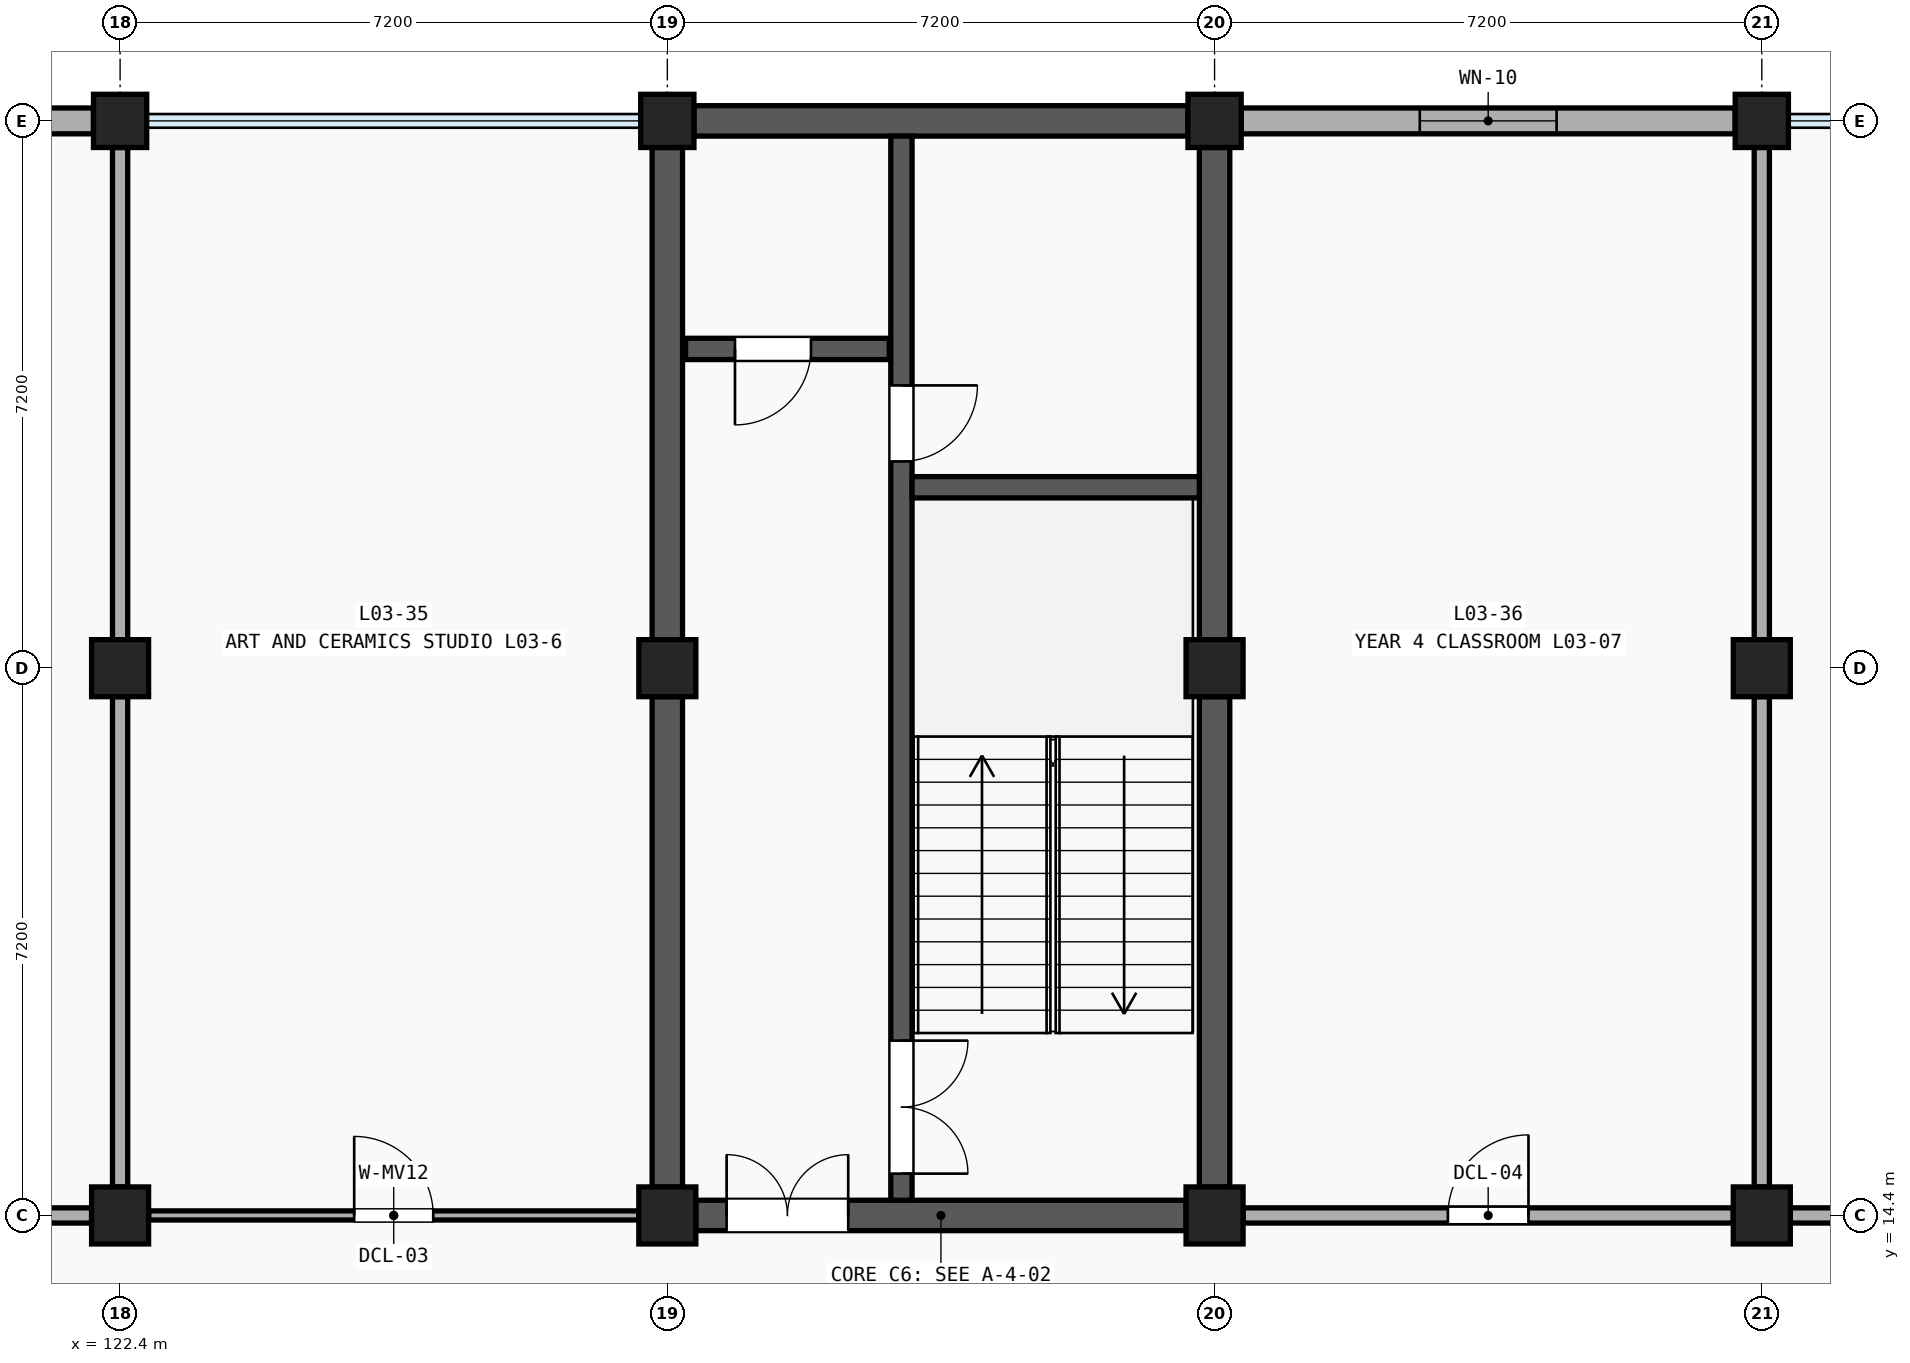
"""IFC4 building model, lengths in metres.
Left out: names, types, materials, properties, quantities, classifications, styles, units other than length and angle.
Written with IfcOpenShell. Run it as: python <this file> out.ifc"""

import sys

from ifc_helpers import new_model, si_unit, direction, frame, frame_2d, origin, origin_2d, place, context, subcontext, project, spatial, rectangle, extrude, element, fill, save


model = new_model("IFC4")
c1 = context("Model", 3, precision=1e-05, world=origin(), true_north=direction((0.0, 1.0)))
c2 = subcontext(c1, "Body", "Model", "MODEL_VIEW")
j1 = project(units=[si_unit("LENGTHUNIT", "METRE"), si_unit("PLANEANGLEUNIT", "RADIAN")], contexts=[c1])
p1 = place(None, origin())
s1 = spatial("IfcSite", under=j1, at=p1, CompositionType="ELEMENT")
p2 = place(p1, origin())
s2 = spatial("IfcBuilding", under=s1, at=p2, CompositionType="ELEMENT")
p3 = place(p2, frame((0.0, 0.0, 14.4)))
s3 = spatial("IfcBuildingStorey", under=s2, at=p3, CompositionType="ELEMENT", Elevation=14.4)
for number, where, z_axis, x_axis in (
    (1, (122.4, 14.4, 0.0), (0.0, 0.0, 1.0), (1.0, 0.0, 0.0)),
    (2, (122.4, 21.6, 0.0), (0.0, 0.0, 1.0), (1.0, 0.0, 0.0)),
):
    element("IfcColumn", number, at=place(p3, frame(where, z_axis=z_axis, x_axis=x_axis)), inside=s3, PredefinedType="COLUMN", context=c2, shape_type="SweptSolid", body=[
        extrude(rectangle(XDim=0.75, YDim=0.75, at=origin_2d()), origin(), (0.0, 0.0, 1.0), 4.2),
    ])
p4 = place(p3, frame((122.4, 28.8, 0.0), z_axis=(0.0, 0.0, 1.0), x_axis=(1.0, 0.0, 0.0)))
e3 = element("IfcColumn", 3, at=p4, inside=s3, PredefinedType="COLUMN", context=c2, shape_type="SweptSolid", body=[
    extrude(rectangle(XDim=0.7, YDim=0.7, at=origin_2d()), origin(), (0.0, 0.0, 1.0), 4.2),
])
for number, where, z_axis, x_axis in (
    (4, (129.6, 14.4, 0.0), (0.0, 0.0, 1.0), (1.0, 0.0, 0.0)),
    (5, (129.6, 21.6, 0.0), (0.0, 0.0, 1.0), (1.0, 0.0, 0.0)),
):
    element("IfcColumn", number, at=place(p3, frame(where, z_axis=z_axis, x_axis=x_axis)), inside=s3, PredefinedType="COLUMN", context=c2, shape_type="SweptSolid", body=[
        extrude(rectangle(XDim=0.75, YDim=0.75, at=origin_2d()), origin(), (0.0, 0.0, 1.0), 4.2),
    ])
p5 = place(p3, frame((129.6, 28.8, 0.0), z_axis=(0.0, 0.0, 1.0), x_axis=(1.0, 0.0, 0.0)))
e6 = element("IfcColumn", 6, at=p5, inside=s3, PredefinedType="COLUMN", context=c2, shape_type="SweptSolid", body=[
    extrude(rectangle(XDim=0.7, YDim=0.7, at=origin_2d()), origin(), (0.0, 0.0, 1.0), 4.2),
])
for number, where, z_axis, x_axis in (
    (7, (136.8, 14.4, 0.0), (0.0, 0.0, 1.0), (1.0, 0.0, 0.0)),
    (8, (136.8, 21.6, 0.0), (0.0, 0.0, 1.0), (1.0, 0.0, 0.0)),
):
    element("IfcColumn", number, at=place(p3, frame(where, z_axis=z_axis, x_axis=x_axis)), inside=s3, PredefinedType="COLUMN", context=c2, shape_type="SweptSolid", body=[
        extrude(rectangle(XDim=0.75, YDim=0.75, at=origin_2d()), origin(), (0.0, 0.0, 1.0), 4.2),
    ])
p6 = place(p3, frame((136.8, 28.8, 0.0), z_axis=(0.0, 0.0, 1.0), x_axis=(1.0, 0.0, 0.0)))
e9 = element("IfcColumn", 9, at=p6, inside=s3, PredefinedType="COLUMN", context=c2, shape_type="SweptSolid", body=[
    extrude(rectangle(XDim=0.7, YDim=0.7, at=origin_2d()), origin(), (0.0, 0.0, 1.0), 4.2),
])
for number, where, z_axis, x_axis in (
    (10, (144.0, 14.4, 0.0), (0.0, 0.0, 1.0), (1.0, 0.0, 0.0)),
    (11, (144.0, 21.6, 0.0), (0.0, 0.0, 1.0), (1.0, 0.0, 0.0)),
):
    element("IfcColumn", number, at=place(p3, frame(where, z_axis=z_axis, x_axis=x_axis)), inside=s3, PredefinedType="COLUMN", context=c2, shape_type="SweptSolid", body=[
        extrude(rectangle(XDim=0.75, YDim=0.75, at=origin_2d()), origin(), (0.0, 0.0, 1.0), 4.2),
    ])
p7 = place(p3, frame((144.0, 28.8, 0.0), z_axis=(0.0, 0.0, 1.0), x_axis=(1.0, 0.0, 0.0)))
e12 = element("IfcColumn", 12, at=p7, inside=s3, PredefinedType="COLUMN", context=c2, shape_type="SweptSolid", body=[
    extrude(rectangle(XDim=0.7, YDim=0.7, at=origin_2d()), origin(), (0.0, 0.0, 1.0), 4.2),
])
p8 = place(p3, frame((115.45, 28.8, 0.0), z_axis=(0.0, 0.0, 1.0), x_axis=(1.0, 0.0, 0.0)))
e13 = element("IfcWall", 13, at=p8, inside=s3, PredefinedType="SOLIDWALL", context=c2, shape_type="SweptSolid", body=[
    extrude(rectangle(XDim=6.6, YDim=0.34, at=frame_2d((3.3, 0.0))), origin(), (0.0, 0.0, 1.0), 3.31),
])
p9 = place(p8, frame((1.8, 0.0, 0.9)))
e14 = element("IfcOpeningElement", 14, at=p9, cuts=e13, PredefinedType="OPENING", context=c2, shape_type="SweptSolid", body=[
    extrude(rectangle(XDim=3.0, YDim=1.8, at=frame_2d((1.5, 0.9))), frame((0.0, 0.182, 0.0), z_axis=(0.0, -1.0, 0.0), x_axis=(1.0, 0.0, 0.0)), (0.0, 0.0, 1.0), 0.364),
])
p10 = place(p3, frame((137.15, 28.8, 0.0), z_axis=(0.0, 0.0, 1.0), x_axis=(1.0, 0.0, 0.0)))
e15 = element("IfcWall", 15, at=p10, inside=s3, PredefinedType="SOLIDWALL", context=c2, shape_type="SweptSolid", body=[
    extrude(rectangle(XDim=6.5, YDim=0.34, at=frame_2d((3.25, 0.0))), origin(), (0.0, 0.0, 1.0), 3.31),
])
p11 = place(p10, frame((2.35, 0.0, 0.85)))
e16 = element("IfcOpeningElement", 16, at=p11, cuts=e15, PredefinedType="OPENING", context=c2, shape_type="SweptSolid", body=[
    extrude(rectangle(XDim=1.8, YDim=2.0, at=frame_2d((0.9, 1.0))), frame((0.0, 0.182, 0.0), z_axis=(0.0, -1.0, 0.0), x_axis=(1.0, 0.0, 0.0)), (0.0, 0.0, 1.0), 0.364),
])
p12 = place(p3, frame((129.6, 14.775, 0.0), z_axis=(0.0, 0.0, 1.0), x_axis=(0.0, 1.0, 0.0)))
e17 = element("IfcWall", 17, at=p12, inside=s3, PredefinedType="SHEAR", context=c2, shape_type="SweptSolid", body=[
    extrude(rectangle(XDim=6.45, YDim=0.4, at=frame_2d((3.225, 0.0))), origin(), (0.0, 0.0, 1.0), 3.17),
])
p13 = place(p3, frame((129.6, 21.975, 0.0), z_axis=(0.0, 0.0, 1.0), x_axis=(0.0, 1.0, 0.0)))
e18 = element("IfcWall", 18, at=p13, inside=s3, PredefinedType="SHEAR", context=c2, shape_type="SweptSolid", body=[
    extrude(rectangle(XDim=6.475, YDim=0.4, at=frame_2d((3.237, 0.0))), origin(), (0.0, 0.0, 1.0), 3.17),
])
p14 = place(p3, frame((136.8, 14.775, 0.0), z_axis=(0.0, 0.0, 1.0), x_axis=(0.0, 1.0, 0.0)))
e19 = element("IfcWall", 19, at=p14, inside=s3, PredefinedType="SHEAR", context=c2, shape_type="SweptSolid", body=[
    extrude(rectangle(XDim=6.45, YDim=0.4, at=frame_2d((3.225, 0.0))), origin(), (0.0, 0.0, 1.0), 3.17),
])
p15 = place(p3, frame((136.8, 21.975, 0.0), z_axis=(0.0, 0.0, 1.0), x_axis=(0.0, 1.0, 0.0)))
e20 = element("IfcWall", 20, at=p15, inside=s3, PredefinedType="SHEAR", context=c2, shape_type="SweptSolid", body=[
    extrude(rectangle(XDim=6.475, YDim=0.4, at=frame_2d((3.237, 0.0))), origin(), (0.0, 0.0, 1.0), 3.17),
])
p16 = place(p3, frame((129.975, 14.4, 0.0), z_axis=(0.0, 0.0, 1.0), x_axis=(1.0, 0.0, 0.0)))
e21 = element("IfcWall", 21, at=p16, inside=s3, PredefinedType="SHEAR", context=c2, shape_type="SweptSolid", body=[
    extrude(rectangle(XDim=6.45, YDim=0.4, at=frame_2d((3.225, 0.0))), origin(), (0.0, 0.0, 1.0), 3.24),
])
p17 = place(p16, frame((0.405, 0.0, 0.0)))
e22 = element("IfcOpeningElement", 22, at=p17, cuts=e21, PredefinedType="OPENING", context=c2, shape_type="SweptSolid", body=[
    extrude(rectangle(XDim=1.6, YDim=2.2, at=frame_2d((0.8, 1.1))), frame((0.0, 0.212, 0.0), z_axis=(0.0, -1.0, 0.0), x_axis=(1.0, 0.0, 0.0)), (0.0, 0.0, 1.0), 0.424),
])
p18 = place(p3, frame((129.95, 28.8, 0.0), z_axis=(0.0, 0.0, 1.0), x_axis=(1.0, 0.0, 0.0)))
e23 = element("IfcWall", 23, at=p18, inside=s3, PredefinedType="SHEAR", context=c2, shape_type="SweptSolid", body=[
    extrude(rectangle(XDim=6.5, YDim=0.4, at=frame_2d((3.25, 0.0))), origin(), (0.0, 0.0, 1.0), 3.31),
])
p19 = place(p3, frame((132.68, 14.6, 0.0), z_axis=(0.0, 0.0, 1.0), x_axis=(0.0, 1.0, 0.0)))
e24 = element("IfcWall", 24, at=p19, inside=s3, PredefinedType="SHEAR", context=c2, shape_type="SweptSolid", body=[
    extrude(rectangle(XDim=14.0, YDim=0.28, at=frame_2d((7.0, 0.0))), origin(), (0.0, 0.0, 1.0), 3.94),
])
p20 = place(p19, frame((0.35, 0.0, 0.0)))
e25 = element("IfcOpeningElement", 25, at=p20, cuts=e24, PredefinedType="OPENING", context=c2, shape_type="SweptSolid", body=[
    extrude(rectangle(XDim=1.75, YDim=2.15, at=frame_2d((0.875, 1.075))), frame((0.0, 0.152, 0.0), z_axis=(0.0, -1.0, 0.0), x_axis=(1.0, 0.0, 0.0)), (0.0, 0.0, 1.0), 0.304),
])
p21 = place(p19, frame((9.72, 0.0, 0.0)))
e26 = element("IfcOpeningElement", 26, at=p21, cuts=e24, PredefinedType="OPENING", context=c2, shape_type="SweptSolid", body=[
    extrude(rectangle(XDim=1.0, YDim=2.15, at=frame_2d((0.5, 1.075))), frame((0.0, 0.152, 0.0), z_axis=(0.0, -1.0, 0.0), x_axis=(1.0, 0.0, 0.0)), (0.0, 0.0, 1.0), 0.304),
])
p22 = place(p3, frame((132.82, 23.98, 0.0), z_axis=(0.0, 0.0, 1.0), x_axis=(1.0, 0.0, 0.0)))
e27 = element("IfcWall", 27, at=p22, inside=s3, PredefinedType="SHEAR", context=c2, shape_type="SweptSolid", body=[
    extrude(rectangle(XDim=3.78, YDim=0.28, at=frame_2d((1.89, 0.0))), origin(), (0.0, 0.0, 1.0), 3.94),
])
p23 = place(p3, frame((129.84, 25.8, 0.0), z_axis=(0.0, 0.0, 1.0), x_axis=(1.0, 0.0, 0.0)))
e28 = element("IfcWall", 28, at=p23, inside=s3, PredefinedType="SHEAR", context=c2, shape_type="SweptSolid", body=[
    extrude(rectangle(XDim=2.68, YDim=0.28, at=frame_2d((1.34, 0.0))), origin(), (0.0, 0.0, 1.0), 3.94),
])
p24 = place(p23, frame((0.65, 0.0, 0.0)))
e29 = element("IfcOpeningElement", 29, at=p24, cuts=e28, PredefinedType="OPENING", context=c2, shape_type="SweptSolid", body=[
    extrude(rectangle(XDim=1.0, YDim=2.15, at=frame_2d((0.5, 1.075))), frame((0.0, 0.152, 0.0), z_axis=(0.0, -1.0, 0.0), x_axis=(1.0, 0.0, 0.0)), (0.0, 0.0, 1.0), 0.304),
])
p25 = place(p3, frame((115.575, 14.4, 0.0), z_axis=(0.0, 0.0, 1.0), x_axis=(1.0, 0.0, 0.0)))
e30 = element("IfcWall", 30, at=p25, inside=s3, PredefinedType="PARTITIONING", context=c2, shape_type="SweptSolid", body=[
    extrude(rectangle(XDim=6.45, YDim=0.2, at=frame_2d((3.225, 0.0))), origin(), (0.0, 0.0, 1.0), 3.17),
])
p26 = place(p25, frame((2.715, 0.0, 0.0)))
e31 = element("IfcOpeningElement", 31, at=p26, cuts=e30, PredefinedType="OPENING", context=c2, shape_type="SweptSolid", body=[
    extrude(rectangle(XDim=1.02, YDim=2.12, at=frame_2d((0.51, 1.06))), frame((0.0, 0.112, 0.0), z_axis=(0.0, -1.0, 0.0), x_axis=(1.0, 0.0, 0.0)), (0.0, 0.0, 1.0), 0.224),
])
p27 = place(p3, frame((122.4, 14.775, 0.0), z_axis=(0.0, 0.0, 1.0), x_axis=(0.0, 1.0, 0.0)))
e32 = element("IfcWall", 32, at=p27, inside=s3, PredefinedType="PARTITIONING", context=c2, shape_type="SweptSolid", body=[
    extrude(rectangle(XDim=6.45, YDim=0.2, at=frame_2d((3.225, 0.0))), origin(), (0.0, 0.0, 1.0), 3.17),
])
p28 = place(p3, frame((122.4, 21.975, 0.0), z_axis=(0.0, 0.0, 1.0), x_axis=(0.0, 1.0, 0.0)))
e33 = element("IfcWall", 33, at=p28, inside=s3, PredefinedType="PARTITIONING", context=c2, shape_type="SweptSolid", body=[
    extrude(rectangle(XDim=6.475, YDim=0.2, at=frame_2d((3.237, 0.0))), origin(), (0.0, 0.0, 1.0), 3.17),
])
p29 = place(p3, frame((122.775, 14.4, 0.0), z_axis=(0.0, 0.0, 1.0), x_axis=(1.0, 0.0, 0.0)))
e34 = element("IfcWall", 34, at=p29, inside=s3, PredefinedType="MOVABLE", context=c2, shape_type="SweptSolid", body=[
    extrude(rectangle(XDim=6.45, YDim=0.12, at=frame_2d((3.225, 0.0))), origin(), (0.0, 0.0, 1.0), 3.17),
])
p30 = place(p29, frame((2.705, 0.0, 0.0)))
e35 = element("IfcOpeningElement", 35, at=p30, cuts=e34, PredefinedType="OPENING", context=c2, shape_type="SweptSolid", body=[
    extrude(rectangle(XDim=1.04, YDim=2.14, at=frame_2d((0.52, 1.07))), frame((0.0, 0.072, 0.0), z_axis=(0.0, -1.0, 0.0), x_axis=(1.0, 0.0, 0.0)), (0.0, 0.0, 1.0), 0.144),
])
p31 = place(p3, frame((137.175, 14.4, 0.0), z_axis=(0.0, 0.0, 1.0), x_axis=(1.0, 0.0, 0.0)))
e36 = element("IfcWall", 36, at=p31, inside=s3, PredefinedType="PARTITIONING", context=c2, shape_type="SweptSolid", body=[
    extrude(rectangle(XDim=6.45, YDim=0.2, at=frame_2d((3.225, 0.0))), origin(), (0.0, 0.0, 1.0), 3.17),
])
p32 = place(p31, frame((2.695, 0.0, 0.0)))
e37 = element("IfcOpeningElement", 37, at=p32, cuts=e36, PredefinedType="OPENING", context=c2, shape_type="SweptSolid", body=[
    extrude(rectangle(XDim=1.06, YDim=2.16, at=frame_2d((0.53, 1.08))), frame((0.0, 0.112, 0.0), z_axis=(0.0, -1.0, 0.0), x_axis=(1.0, 0.0, 0.0)), (0.0, 0.0, 1.0), 0.224),
])
p33 = place(p3, frame((144.0, 14.775, 0.0), z_axis=(0.0, 0.0, 1.0), x_axis=(0.0, 1.0, 0.0)))
e38 = element("IfcWall", 38, at=p33, inside=s3, PredefinedType="PARTITIONING", context=c2, shape_type="SweptSolid", body=[
    extrude(rectangle(XDim=6.45, YDim=0.2, at=frame_2d((3.225, 0.0))), origin(), (0.0, 0.0, 1.0), 3.17),
])
p34 = place(p3, frame((144.0, 21.975, 0.0), z_axis=(0.0, 0.0, 1.0), x_axis=(0.0, 1.0, 0.0)))
e39 = element("IfcWall", 39, at=p34, inside=s3, PredefinedType="PARTITIONING", context=c2, shape_type="SweptSolid", body=[
    extrude(rectangle(XDim=6.475, YDim=0.2, at=frame_2d((3.237, 0.0))), origin(), (0.0, 0.0, 1.0), 3.17),
])
p35 = place(p3, frame((144.375, 14.4, 0.0), z_axis=(0.0, 0.0, 1.0), x_axis=(1.0, 0.0, 0.0)))
e40 = element("IfcWall", 40, at=p35, inside=s3, PredefinedType="PARTITIONING", context=c2, shape_type="SweptSolid", body=[
    extrude(rectangle(XDim=6.45, YDim=0.2, at=frame_2d((3.225, 0.0))), origin(), (0.0, 0.0, 1.0), 3.17),
])
p36 = place(p35, frame((2.685, 0.0, 0.0)))
e41 = element("IfcOpeningElement", 41, at=p36, cuts=e40, PredefinedType="OPENING", context=c2, shape_type="SweptSolid", body=[
    extrude(rectangle(XDim=1.08, YDim=2.18, at=frame_2d((0.54, 1.09))), frame((0.0, 0.112, 0.0), z_axis=(0.0, -1.0, 0.0), x_axis=(1.0, 0.0, 0.0)), (0.0, 0.0, 1.0), 0.224),
])
p37 = place(p11, origin())
e42 = element("IfcWindow", 42, at=p37, inside=s3, PartitioningType="SINGLE_PANEL", PredefinedType="WINDOW", context=c2, shape_type="SweptSolid", body=[
    extrude(rectangle(XDim=1.8, YDim=2.0, at=frame_2d((0.9, 1.0))), frame((0.0, 0.03, 0.0), z_axis=(0.0, -1.0, 0.0), x_axis=(1.0, 0.0, 0.0)), (0.0, 0.0, 1.0), 0.06),
])
fill(e16, e42)
p38 = place(p17, origin())
e43 = element("IfcDoor", 43, at=p38, inside=s3, OperationType="DOUBLE_DOOR_SINGLE_SWING", PredefinedType="DOOR", context=c2, shape_type="SweptSolid", body=[
    extrude(rectangle(XDim=1.6, YDim=2.2, at=frame_2d((0.8, 1.1))), frame((0.0, 0.025, 0.0), z_axis=(0.0, -1.0, 0.0), x_axis=(1.0, 0.0, 0.0)), (0.0, 0.0, 1.0), 0.05),
])
fill(e22, e43)
p39 = place(p20, frame((1.75, 0.0, 0.0), z_axis=(0.0, 0.0, 1.0), x_axis=(-1.0, 0.0, 0.0)))
e44 = element("IfcDoor", 44, at=p39, inside=s3, OperationType="DOUBLE_DOOR_SINGLE_SWING", PredefinedType="DOOR", context=c2, shape_type="SweptSolid", body=[
    extrude(rectangle(XDim=1.75, YDim=2.15, at=frame_2d((0.875, 1.075))), frame((0.0, 0.025, 0.0), z_axis=(0.0, -1.0, 0.0), x_axis=(1.0, 0.0, 0.0)), (0.0, 0.0, 1.0), 0.05),
])
fill(e25, e44)
p40 = place(p21, frame((1.0, 0.0, 0.0), z_axis=(0.0, 0.0, 1.0), x_axis=(-1.0, 0.0, 0.0)))
e45 = element("IfcDoor", 45, at=p40, inside=s3, OperationType="SINGLE_SWING_LEFT", PredefinedType="DOOR", context=c2, shape_type="SweptSolid", body=[
    extrude(rectangle(XDim=1.0, YDim=2.15, at=frame_2d((0.5, 1.075))), frame((0.0, 0.025, 0.0), z_axis=(0.0, -1.0, 0.0), x_axis=(1.0, 0.0, 0.0)), (0.0, 0.0, 1.0), 0.05),
])
fill(e26, e45)
p41 = place(p24, frame((1.0, 0.0, 0.0), z_axis=(0.0, 0.0, 1.0), x_axis=(-1.0, 0.0, 0.0)))
e46 = element("IfcDoor", 46, at=p41, inside=s3, OperationType="SINGLE_SWING_RIGHT", PredefinedType="DOOR", context=c2, shape_type="SweptSolid", body=[
    extrude(rectangle(XDim=1.0, YDim=2.15, at=frame_2d((0.5, 1.075))), frame((0.0, 0.025, 0.0), z_axis=(0.0, -1.0, 0.0), x_axis=(1.0, 0.0, 0.0)), (0.0, 0.0, 1.0), 0.05),
])
fill(e29, e46)
p42 = place(p30, origin())
e47 = element("IfcDoor", 47, at=p42, inside=s3, OperationType="SINGLE_SWING_LEFT", PredefinedType="DOOR", context=c2, shape_type="SweptSolid", body=[
    extrude(rectangle(XDim=1.04, YDim=2.14, at=frame_2d((0.52, 1.07))), frame((0.0, 0.025, 0.0), z_axis=(0.0, -1.0, 0.0), x_axis=(1.0, 0.0, 0.0)), (0.0, 0.0, 1.0), 0.05),
])
fill(e35, e47)
p43 = place(p32, origin())
e48 = element("IfcDoor", 48, at=p43, inside=s3, OperationType="SINGLE_SWING_RIGHT", PredefinedType="DOOR", context=c2, shape_type="SweptSolid", body=[
    extrude(rectangle(XDim=1.06, YDim=2.16, at=frame_2d((0.53, 1.08))), frame((0.0, 0.025, 0.0), z_axis=(0.0, -1.0, 0.0), x_axis=(1.0, 0.0, 0.0)), (0.0, 0.0, 1.0), 0.05),
])
fill(e37, e48)
save(model, sys.argv[1])
